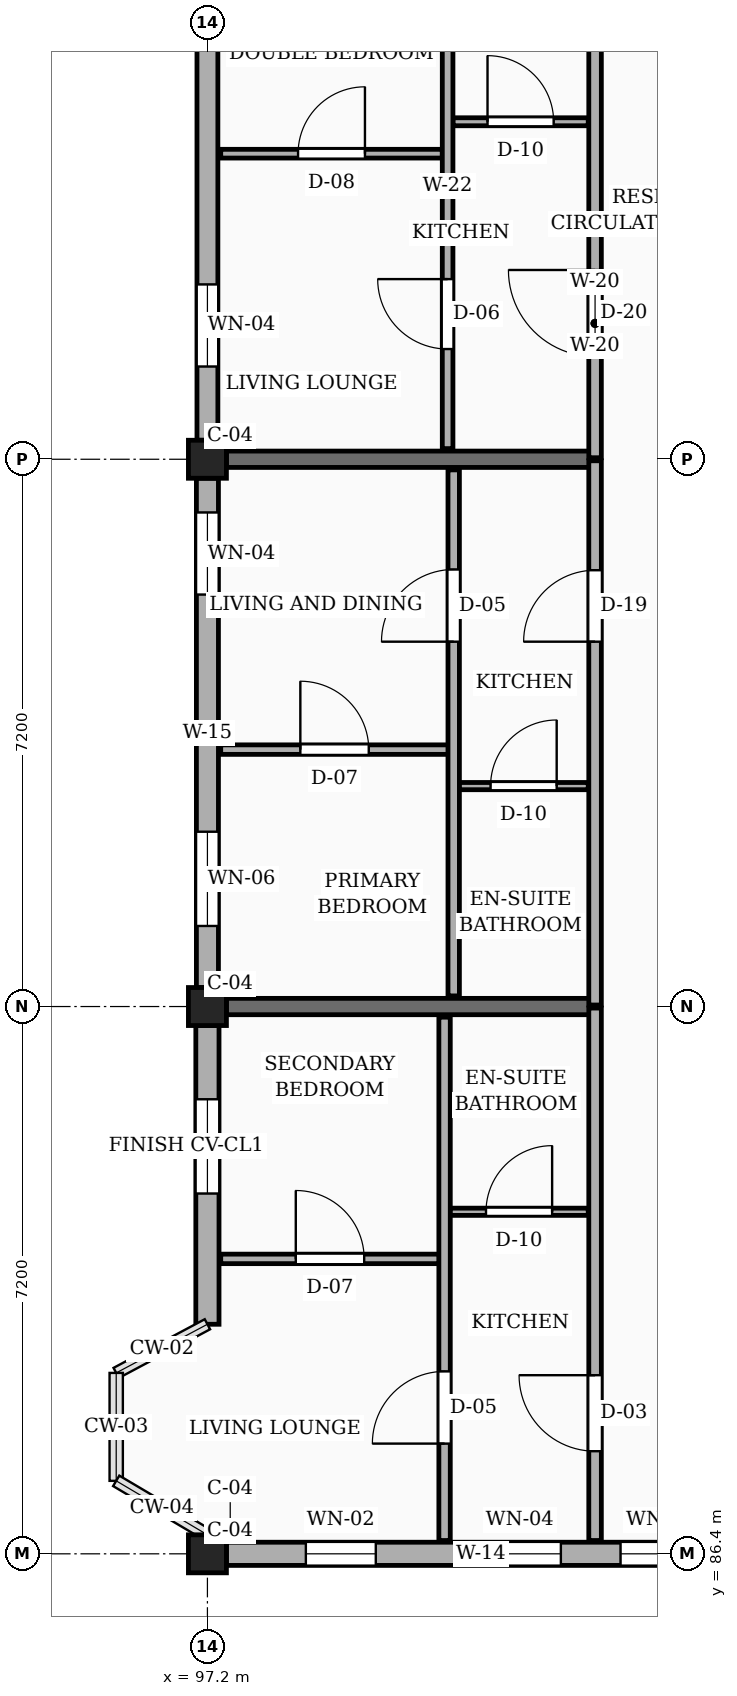
"""IFC4 building model, lengths in metres.
Left out: names, types, materials, properties, quantities, classifications, styles, units other than length and angle.
Written with IfcOpenShell. Run it as: python <this file> out.ifc"""

import sys

from ifc_helpers import new_model, si_unit, direction, frame, frame_2d, origin, origin_2d, place, context, subcontext, project, spatial, rectangle, extrude, element, fill, save


model = new_model("IFC4")
c1 = context("Model", 3, precision=1e-05, world=origin(), true_north=direction((0.0, 1.0)))
c2 = subcontext(c1, "Body", "Model", "MODEL_VIEW")
j1 = project(units=[si_unit("LENGTHUNIT", "METRE"), si_unit("PLANEANGLEUNIT", "RADIAN")], contexts=[c1])
p1 = place(None, origin())
s1 = spatial("IfcSite", under=j1, at=p1, CompositionType="ELEMENT")
p2 = place(p1, origin())
s2 = spatial("IfcBuilding", under=s1, at=p2, CompositionType="ELEMENT")
p3 = place(p2, frame((0.0, 0.0, 29.7)))
s3 = spatial("IfcBuildingStorey", under=s2, at=p3, CompositionType="ELEMENT", Elevation=29.7)
for number, where, z_axis, x_axis in (
    (1, (97.2, 86.4, 0.0), (0.0, 0.0, 1.0), (1.0, 0.0, 0.0)),
    (2, (97.2, 93.6, 0.0), (0.0, 0.0, 1.0), (1.0, 0.0, 0.0)),
    (3, (97.2, 100.8, 0.0), (0.0, 0.0, 1.0), (1.0, 0.0, 0.0)),
):
    element("IfcColumn", number, at=place(p3, frame(where, z_axis=z_axis, x_axis=x_axis)), inside=s3, PredefinedType="COLUMN", context=c2, shape_type="SweptSolid", body=[
        extrude(rectangle(XDim=0.5, YDim=0.5, at=origin_2d()), origin(), (0.0, 0.0, 1.0), 3.15),
    ])
for number, where, z_axis, x_axis in (
    (4, (97.45, 93.6, 0.0), (0.0, 0.0, 1.0), (1.0, 0.0, 0.0)),
    (5, (97.45, 100.8, 0.0), (0.0, 0.0, 1.0), (1.0, 0.0, 0.0)),
):
    element("IfcWall", number, at=place(p3, frame(where, z_axis=z_axis, x_axis=x_axis)), inside=s3, PredefinedType="SOLIDWALL", context=c2, shape_type="SweptSolid", body=[
        extrude(rectangle(XDim=4.85, YDim=0.215, at=frame_2d((2.425, 0.0))), origin(), (0.0, 0.0, 1.0), 2.19),
    ])
p4 = place(p3, frame((97.45, 86.4, 0.0), z_axis=(0.0, 0.0, 1.0), x_axis=(1.0, 0.0, 0.0)))
e6 = element("IfcWall", 6, at=p4, inside=s3, PredefinedType="SOLIDWALL", context=c2, shape_type="SweptSolid", body=[
    extrude(rectangle(XDim=6.7, YDim=0.305, at=frame_2d((3.35, 0.0))), origin(), (0.0, 0.0, 1.0), 2.46),
])
p5 = place(p4, frame((1.045, 0.0, 0.78)))
e7 = element("IfcOpeningElement", 7, at=p5, cuts=e6, PredefinedType="OPENING", context=c2, shape_type="SweptSolid", body=[
    extrude(rectangle(XDim=0.92, YDim=1.15, at=frame_2d((0.46, 0.575))), frame((0.0, 0.163, 0.0), z_axis=(0.0, -1.0, 0.0), x_axis=(1.0, 0.0, 0.0)), (0.0, 0.0, 1.0), 0.325),
])
p6 = place(p4, frame((3.32, 0.0, 0.78)))
e8 = element("IfcOpeningElement", 8, at=p6, cuts=e6, PredefinedType="OPENING", context=c2, shape_type="SweptSolid", body=[
    extrude(rectangle(XDim=1.08, YDim=1.15, at=frame_2d((0.54, 0.575))), frame((0.0, 0.163, 0.0), z_axis=(0.0, -1.0, 0.0), x_axis=(1.0, 0.0, 0.0)), (0.0, 0.0, 1.0), 0.325),
])
p7 = place(p4, frame((5.185, 0.0, 0.78)))
e9 = element("IfcOpeningElement", 9, at=p7, cuts=e6, PredefinedType="OPENING", context=c2, shape_type="SweptSolid", body=[
    extrude(rectangle(XDim=1.04, YDim=1.26, at=frame_2d((0.52, 0.63))), frame((0.0, 0.163, 0.0), z_axis=(0.0, -1.0, 0.0), x_axis=(1.0, 0.0, 0.0)), (0.0, 0.0, 1.0), 0.325),
])
p8 = place(p3, frame((97.2, 107.75, 0.0), z_axis=(0.0, 0.0, 1.0), x_axis=(0.0, -1.0, 0.0)))
e10 = element("IfcWall", 10, at=p8, inside=s3, PredefinedType="SOLIDWALL", context=c2, shape_type="SweptSolid", body=[
    extrude(rectangle(XDim=6.7, YDim=0.275, at=frame_2d((3.35, 0.0))), origin(), (0.0, 0.0, 1.0), 2.46),
])
p9 = place(p8, frame((0.45, 0.0, 0.78)))
e11 = element("IfcOpeningElement", 11, at=p9, cuts=e10, PredefinedType="OPENING", context=c2, shape_type="SweptSolid", body=[
    extrude(rectangle(XDim=0.92, YDim=1.15, at=frame_2d((0.46, 0.575))), frame((0.0, 0.147, 0.0), z_axis=(0.0, -1.0, 0.0), x_axis=(1.0, 0.0, 0.0)), (0.0, 0.0, 1.0), 0.295),
])
p10 = place(p8, frame((4.65, 0.0, 0.78)))
e12 = element("IfcOpeningElement", 12, at=p10, cuts=e10, PredefinedType="OPENING", context=c2, shape_type="SweptSolid", body=[
    extrude(rectangle(XDim=1.08, YDim=1.15, at=frame_2d((0.54, 0.575))), frame((0.0, 0.147, 0.0), z_axis=(0.0, -1.0, 0.0), x_axis=(1.0, 0.0, 0.0)), (0.0, 0.0, 1.0), 0.295),
])
p11 = place(p3, frame((97.2, 100.55, 0.0), z_axis=(0.0, 0.0, 1.0), x_axis=(0.0, -1.0, 0.0)))
e13 = element("IfcWall", 13, at=p11, inside=s3, PredefinedType="SOLIDWALL", context=c2, shape_type="SweptSolid", body=[
    extrude(rectangle(XDim=6.7, YDim=0.29, at=frame_2d((3.35, 0.0))), origin(), (0.0, 0.0, 1.0), 2.46),
])
p12 = place(p11, frame((0.45, 0.0, 0.78)))
e14 = element("IfcOpeningElement", 14, at=p12, cuts=e13, PredefinedType="OPENING", context=c2, shape_type="SweptSolid", body=[
    extrude(rectangle(XDim=1.08, YDim=1.15, at=frame_2d((0.54, 0.575))), frame((0.0, 0.155, 0.0), z_axis=(0.0, -1.0, 0.0), x_axis=(1.0, 0.0, 0.0)), (0.0, 0.0, 1.0), 0.31),
])
p13 = place(p11, frame((4.65, 0.0, 0.78)))
e15 = element("IfcOpeningElement", 15, at=p13, cuts=e13, PredefinedType="OPENING", context=c2, shape_type="SweptSolid", body=[
    extrude(rectangle(XDim=1.24, YDim=1.15, at=frame_2d((0.62, 0.575))), frame((0.0, 0.155, 0.0), z_axis=(0.0, -1.0, 0.0), x_axis=(1.0, 0.0, 0.0)), (0.0, 0.0, 1.0), 0.31),
])
p14 = place(p3, frame((97.2, 93.35, 0.0), z_axis=(0.0, 0.0, 1.0), x_axis=(0.0, -1.0, 0.0)))
e16 = element("IfcWall", 16, at=p14, inside=s3, PredefinedType="SOLIDWALL", context=c2, shape_type="SweptSolid", body=[
    extrude(rectangle(XDim=3.93, YDim=0.305, at=frame_2d((1.965, 0.0))), origin(), (0.0, 0.0, 1.0), 2.46),
])
p15 = place(p14, frame((0.97, 0.0, 0.78)))
e17 = element("IfcOpeningElement", 17, at=p15, cuts=e16, PredefinedType="OPENING", context=c2, shape_type="SweptSolid", body=[
    extrude(rectangle(XDim=1.24, YDim=1.15, at=frame_2d((0.62, 0.575))), frame((0.0, 0.163, 0.0), z_axis=(0.0, -1.0, 0.0), x_axis=(1.0, 0.0, 0.0)), (0.0, 0.0, 1.0), 0.325),
])
p16 = place(p3, frame((102.3, 86.575, 0.0), z_axis=(0.0, 0.0, 1.0), x_axis=(0.0, 1.0, 0.0)))
e18 = element("IfcWall", 18, at=p16, inside=s3, PredefinedType="PARTITIONING", context=c2, shape_type="SweptSolid", body=[
    extrude(rectangle(XDim=7.005, YDim=0.165, at=frame_2d((3.502, 0.0))), origin(), (0.0, 0.0, 1.0), 2.325),
])
p17 = place(p16, frame((1.175, 0.0, 0.0)))
e19 = element("IfcOpeningElement", 19, at=p17, cuts=e18, PredefinedType="OPENING", context=c2, shape_type="SweptSolid", body=[
    extrude(rectangle(XDim=1.0, YDim=2.15, at=frame_2d((0.5, 1.075))), frame((0.0, 0.093, 0.0), z_axis=(0.0, -1.0, 0.0), x_axis=(1.0, 0.0, 0.0)), (0.0, 0.0, 1.0), 0.185),
])
p18 = place(p3, frame((102.3, 93.62, 0.0), z_axis=(0.0, 0.0, 1.0), x_axis=(0.0, 1.0, 0.0)))
e20 = element("IfcWall", 20, at=p18, inside=s3, PredefinedType="PARTITIONING", context=c2, shape_type="SweptSolid", body=[
    extrude(rectangle(XDim=7.16, YDim=0.165, at=frame_2d((3.58, 0.0))), origin(), (0.0, 0.0, 1.0), 2.325),
])
p19 = place(p18, frame((4.78, 0.0, 0.0)))
e21 = element("IfcOpeningElement", 21, at=p19, cuts=e20, PredefinedType="OPENING", context=c2, shape_type="SweptSolid", body=[
    extrude(rectangle(XDim=0.94, YDim=2.12, at=frame_2d((0.47, 1.06))), frame((0.0, 0.093, 0.0), z_axis=(0.0, -1.0, 0.0), x_axis=(1.0, 0.0, 0.0)), (0.0, 0.0, 1.0), 0.185),
])
p20 = place(p3, frame((102.3, 100.82, 0.0), z_axis=(0.0, 0.0, 1.0), x_axis=(0.0, 1.0, 0.0)))
e22 = element("IfcWall", 22, at=p20, inside=s3, PredefinedType="PARTITIONING", context=c2, shape_type="SweptSolid", body=[
    extrude(rectangle(XDim=7.16, YDim=0.165, at=frame_2d((3.58, 0.0))), origin(), (0.0, 0.0, 1.0), 2.325),
])
p21 = place(p20, frame((1.33, 0.0, 0.0)))
e23 = element("IfcOpeningElement", 23, at=p21, cuts=e22, PredefinedType="OPENING", context=c2, shape_type="SweptSolid", body=[
    extrude(rectangle(XDim=1.14, YDim=2.18, at=frame_2d((0.57, 1.09))), frame((0.0, 0.093, 0.0), z_axis=(0.0, -1.0, 0.0), x_axis=(1.0, 0.0, 0.0)), (0.0, 0.0, 1.0), 0.185),
])
p22 = place(p3, frame((97.375, 90.28, 0.0), z_axis=(0.0, 0.0, 1.0), x_axis=(1.0, 0.0, 0.0)))
e24 = element("IfcWall", 24, at=p22, inside=s3, PredefinedType="PARTITIONING", context=c2, shape_type="SweptSolid", body=[
    extrude(rectangle(XDim=2.875, YDim=0.125, at=frame_2d((1.438, 0.0))), origin(), (0.0, 0.0, 1.0), 2.325),
])
p23 = place(p22, frame((0.988, 0.0, 0.0)))
e25 = element("IfcOpeningElement", 25, at=p23, cuts=e24, PredefinedType="OPENING", context=c2, shape_type="SweptSolid", body=[
    extrude(rectangle(XDim=0.9, YDim=2.1, at=frame_2d((0.45, 1.05))), frame((0.0, 0.073, 0.0), z_axis=(0.0, -1.0, 0.0), x_axis=(1.0, 0.0, 0.0)), (0.0, 0.0, 1.0), 0.145),
])
p24 = place(p3, frame((100.39, 90.9, 0.0), z_axis=(0.0, 0.0, 1.0), x_axis=(1.0, 0.0, 0.0)))
e26 = element("IfcWall", 26, at=p24, inside=s3, PredefinedType="PARTITIONING", context=c2, shape_type="SweptSolid", body=[
    extrude(rectangle(XDim=1.82, YDim=0.095, at=frame_2d((0.91, 0.0))), origin(), (0.0, 0.0, 1.0), 2.325),
])
p25 = place(p24, frame((0.475, 0.0, 0.0)))
e27 = element("IfcOpeningElement", 27, at=p25, cuts=e26, PredefinedType="OPENING", context=c2, shape_type="SweptSolid", body=[
    extrude(rectangle(XDim=0.87, YDim=2.05, at=frame_2d((0.435, 1.025))), frame((0.0, 0.058, 0.0), z_axis=(0.0, -1.0, 0.0), x_axis=(1.0, 0.0, 0.0)), (0.0, 0.0, 1.0), 0.115),
])
p26 = place(p3, frame((100.32, 86.575, 0.0), z_axis=(0.0, 0.0, 1.0), x_axis=(0.0, 1.0, 0.0)))
e28 = element("IfcWall", 28, at=p26, inside=s3, PredefinedType="PARTITIONING", context=c2, shape_type="SweptSolid", body=[
    extrude(rectangle(XDim=6.885, YDim=0.15, at=frame_2d((3.442, 0.0))), origin(), (0.0, 0.0, 1.0), 2.325),
])
p27 = place(p26, frame((1.275, 0.0, 0.0)))
e29 = element("IfcOpeningElement", 29, at=p27, cuts=e28, PredefinedType="OPENING", context=c2, shape_type="SweptSolid", body=[
    extrude(rectangle(XDim=0.95, YDim=2.1, at=frame_2d((0.475, 1.05))), frame((0.0, 0.085, 0.0), z_axis=(0.0, -1.0, 0.0), x_axis=(1.0, 0.0, 0.0)), (0.0, 0.0, 1.0), 0.17),
])
p28 = place(p3, frame((97.375, 96.98, 0.0), z_axis=(0.0, 0.0, 1.0), x_axis=(1.0, 0.0, 0.0)))
e30 = element("IfcWall", 30, at=p28, inside=s3, PredefinedType="PARTITIONING", context=c2, shape_type="SweptSolid", body=[
    extrude(rectangle(XDim=2.995, YDim=0.125, at=frame_2d((1.498, 0.0))), origin(), (0.0, 0.0, 1.0), 2.325),
])
p29 = place(p28, frame((1.048, 0.0, 0.0)))
e31 = element("IfcOpeningElement", 31, at=p29, cuts=e30, PredefinedType="OPENING", context=c2, shape_type="SweptSolid", body=[
    extrude(rectangle(XDim=0.9, YDim=2.1, at=frame_2d((0.45, 1.05))), frame((0.0, 0.073, 0.0), z_axis=(0.0, -1.0, 0.0), x_axis=(1.0, 0.0, 0.0)), (0.0, 0.0, 1.0), 0.145),
])
p30 = place(p3, frame((100.51, 96.5, 0.0), z_axis=(0.0, 0.0, 1.0), x_axis=(1.0, 0.0, 0.0)))
e32 = element("IfcWall", 32, at=p30, inside=s3, PredefinedType="PARTITIONING", context=c2, shape_type="SweptSolid", body=[
    extrude(rectangle(XDim=1.7, YDim=0.095, at=frame_2d((0.85, 0.0))), origin(), (0.0, 0.0, 1.0), 2.325),
])
p31 = place(p30, frame((0.415, 0.0, 0.0)))
e33 = element("IfcOpeningElement", 33, at=p31, cuts=e32, PredefinedType="OPENING", context=c2, shape_type="SweptSolid", body=[
    extrude(rectangle(XDim=0.87, YDim=2.05, at=frame_2d((0.435, 1.025))), frame((0.0, 0.058, 0.0), z_axis=(0.0, -1.0, 0.0), x_axis=(1.0, 0.0, 0.0)), (0.0, 0.0, 1.0), 0.115),
])
p32 = place(p3, frame((100.44, 93.74, 0.0), z_axis=(0.0, 0.0, 1.0), x_axis=(0.0, 1.0, 0.0)))
e34 = element("IfcWall", 34, at=p32, inside=s3, PredefinedType="PARTITIONING", context=c2, shape_type="SweptSolid", body=[
    extrude(rectangle(XDim=6.92, YDim=0.15, at=frame_2d((3.46, 0.0))), origin(), (0.0, 0.0, 1.0), 2.325),
])
p33 = place(p32, frame((4.66, 0.0, 0.0)))
e35 = element("IfcOpeningElement", 35, at=p33, cuts=e34, PredefinedType="OPENING", context=c2, shape_type="SweptSolid", body=[
    extrude(rectangle(XDim=0.95, YDim=2.1, at=frame_2d((0.475, 1.05))), frame((0.0, 0.085, 0.0), z_axis=(0.0, -1.0, 0.0), x_axis=(1.0, 0.0, 0.0)), (0.0, 0.0, 1.0), 0.17),
])
p34 = place(p3, frame((97.375, 104.82, 0.0), z_axis=(0.0, 0.0, 1.0), x_axis=(1.0, 0.0, 0.0)))
e36 = element("IfcWall", 36, at=p34, inside=s3, PredefinedType="PARTITIONING", context=c2, shape_type="SweptSolid", body=[
    extrude(rectangle(XDim=2.915, YDim=0.115, at=frame_2d((1.458, 0.0))), origin(), (0.0, 0.0, 1.0), 2.325),
])
p35 = place(p34, frame((1.018, 0.0, 0.0)))
e37 = element("IfcOpeningElement", 37, at=p35, cuts=e36, PredefinedType="OPENING", context=c2, shape_type="SweptSolid", body=[
    extrude(rectangle(XDim=0.88, YDim=2.08, at=frame_2d((0.44, 1.04))), frame((0.0, 0.067, 0.0), z_axis=(0.0, -1.0, 0.0), x_axis=(1.0, 0.0, 0.0)), (0.0, 0.0, 1.0), 0.135),
])
p36 = place(p3, frame((100.43, 105.24, 0.0), z_axis=(0.0, 0.0, 1.0), x_axis=(1.0, 0.0, 0.0)))
e38 = element("IfcWall", 38, at=p36, inside=s3, PredefinedType="PARTITIONING", context=c2, shape_type="SweptSolid", body=[
    extrude(rectangle(XDim=1.78, YDim=0.105, at=frame_2d((0.89, 0.0))), origin(), (0.0, 0.0, 1.0), 2.325),
])
p37 = place(p36, frame((0.455, 0.0, 0.0)))
e39 = element("IfcOpeningElement", 39, at=p37, cuts=e38, PredefinedType="OPENING", context=c2, shape_type="SweptSolid", body=[
    extrude(rectangle(XDim=0.87, YDim=2.05, at=frame_2d((0.435, 1.025))), frame((0.0, 0.062, 0.0), z_axis=(0.0, -1.0, 0.0), x_axis=(1.0, 0.0, 0.0)), (0.0, 0.0, 1.0), 0.125),
])
p38 = place(p3, frame((100.36, 100.94, 0.0), z_axis=(0.0, 0.0, 1.0), x_axis=(0.0, 1.0, 0.0)))
e40 = element("IfcWall", 40, at=p38, inside=s3, PredefinedType="PARTITIONING", context=c2, shape_type="SweptSolid", body=[
    extrude(rectangle(XDim=6.92, YDim=0.14, at=frame_2d((3.46, 0.0))), origin(), (0.0, 0.0, 1.0), 2.325),
])
p39 = place(p38, frame((1.31, 0.0, 0.0)))
e41 = element("IfcOpeningElement", 41, at=p39, cuts=e40, PredefinedType="OPENING", context=c2, shape_type="SweptSolid", body=[
    extrude(rectangle(XDim=0.92, YDim=2.1, at=frame_2d((0.46, 1.05))), frame((0.0, 0.08, 0.0), z_axis=(0.0, -1.0, 0.0), x_axis=(1.0, 0.0, 0.0)), (0.0, 0.0, 1.0), 0.16),
])
p40 = place(p5, origin())
e42 = element("IfcWindow", 42, at=p40, inside=s3, PartitioningType="SINGLE_PANEL", PredefinedType="WINDOW", context=c2, shape_type="SweptSolid", body=[
    extrude(rectangle(XDim=0.92, YDim=1.15, at=frame_2d((0.46, 0.575))), frame((0.0, 0.03, 0.0), z_axis=(0.0, -1.0, 0.0), x_axis=(1.0, 0.0, 0.0)), (0.0, 0.0, 1.0), 0.06),
])
fill(e7, e42)
p41 = place(p6, origin())
e43 = element("IfcWindow", 43, at=p41, inside=s3, PartitioningType="SINGLE_PANEL", PredefinedType="WINDOW", context=c2, shape_type="SweptSolid", body=[
    extrude(rectangle(XDim=1.08, YDim=1.15, at=frame_2d((0.54, 0.575))), frame((0.0, 0.03, 0.0), z_axis=(0.0, -1.0, 0.0), x_axis=(1.0, 0.0, 0.0)), (0.0, 0.0, 1.0), 0.06),
])
fill(e8, e43)
p42 = place(p7, origin())
e44 = element("IfcWindow", 44, at=p42, inside=s3, PartitioningType="SINGLE_PANEL", PredefinedType="WINDOW", context=c2, shape_type="SweptSolid", body=[
    extrude(rectangle(XDim=1.04, YDim=1.26, at=frame_2d((0.52, 0.63))), frame((0.0, 0.03, 0.0), z_axis=(0.0, -1.0, 0.0), x_axis=(1.0, 0.0, 0.0)), (0.0, 0.0, 1.0), 0.06),
])
fill(e9, e44)
p43 = place(p10, origin())
e45 = element("IfcWindow", 45, at=p43, inside=s3, PartitioningType="SINGLE_PANEL", PredefinedType="WINDOW", context=c2, shape_type="SweptSolid", body=[
    extrude(rectangle(XDim=1.08, YDim=1.15, at=frame_2d((0.54, 0.575))), frame((0.0, 0.03, 0.0), z_axis=(0.0, -1.0, 0.0), x_axis=(1.0, 0.0, 0.0)), (0.0, 0.0, 1.0), 0.06),
])
fill(e12, e45)
p44 = place(p12, origin())
e46 = element("IfcWindow", 46, at=p44, inside=s3, PartitioningType="SINGLE_PANEL", PredefinedType="WINDOW", context=c2, shape_type="SweptSolid", body=[
    extrude(rectangle(XDim=1.08, YDim=1.15, at=frame_2d((0.54, 0.575))), frame((0.0, 0.03, 0.0), z_axis=(0.0, -1.0, 0.0), x_axis=(1.0, 0.0, 0.0)), (0.0, 0.0, 1.0), 0.06),
])
fill(e14, e46)
p45 = place(p13, origin())
e47 = element("IfcWindow", 47, at=p45, inside=s3, PartitioningType="SINGLE_PANEL", PredefinedType="WINDOW", context=c2, shape_type="SweptSolid", body=[
    extrude(rectangle(XDim=1.24, YDim=1.15, at=frame_2d((0.62, 0.575))), frame((0.0, 0.03, 0.0), z_axis=(0.0, -1.0, 0.0), x_axis=(1.0, 0.0, 0.0)), (0.0, 0.0, 1.0), 0.06),
])
fill(e15, e47)
p46 = place(p15, origin())
e48 = element("IfcWindow", 48, at=p46, inside=s3, PartitioningType="SINGLE_PANEL", PredefinedType="WINDOW", context=c2, shape_type="SweptSolid", body=[
    extrude(rectangle(XDim=1.24, YDim=1.15, at=frame_2d((0.62, 0.575))), frame((0.0, 0.03, 0.0), z_axis=(0.0, -1.0, 0.0), x_axis=(1.0, 0.0, 0.0)), (0.0, 0.0, 1.0), 0.06),
])
fill(e17, e48)
p47 = place(p17, origin())
e49 = element("IfcDoor", 49, at=p47, inside=s3, OperationType="SINGLE_SWING_RIGHT", PredefinedType="DOOR", context=c2, shape_type="SweptSolid", body=[
    extrude(rectangle(XDim=1.0, YDim=2.15, at=frame_2d((0.5, 1.075))), frame((0.0, 0.025, 0.0), z_axis=(0.0, -1.0, 0.0), x_axis=(1.0, 0.0, 0.0)), (0.0, 0.0, 1.0), 0.05),
])
fill(e19, e49)
p48 = place(p19, origin())
e50 = element("IfcDoor", 50, at=p48, inside=s3, OperationType="SINGLE_SWING_LEFT", PredefinedType="DOOR", context=c2, shape_type="SweptSolid", body=[
    extrude(rectangle(XDim=0.94, YDim=2.12, at=frame_2d((0.47, 1.06))), frame((0.0, 0.025, 0.0), z_axis=(0.0, -1.0, 0.0), x_axis=(1.0, 0.0, 0.0)), (0.0, 0.0, 1.0), 0.05),
])
fill(e21, e50)
p49 = place(p21, origin())
e51 = element("IfcDoor", 51, at=p49, inside=s3, OperationType="SINGLE_SWING_RIGHT", PredefinedType="DOOR", context=c2, shape_type="SweptSolid", body=[
    extrude(rectangle(XDim=1.14, YDim=2.18, at=frame_2d((0.57, 1.09))), frame((0.0, 0.025, 0.0), z_axis=(0.0, -1.0, 0.0), x_axis=(1.0, 0.0, 0.0)), (0.0, 0.0, 1.0), 0.05),
])
fill(e23, e51)
p50 = place(p23, origin())
e52 = element("IfcDoor", 52, at=p50, inside=s3, OperationType="SINGLE_SWING_LEFT", PredefinedType="DOOR", context=c2, shape_type="SweptSolid", body=[
    extrude(rectangle(XDim=0.9, YDim=2.1, at=frame_2d((0.45, 1.05))), frame((0.0, 0.025, 0.0), z_axis=(0.0, -1.0, 0.0), x_axis=(1.0, 0.0, 0.0)), (0.0, 0.0, 1.0), 0.05),
])
fill(e25, e52)
p51 = place(p25, origin())
e53 = element("IfcDoor", 53, at=p51, inside=s3, OperationType="SINGLE_SWING_RIGHT", PredefinedType="DOOR", context=c2, shape_type="SweptSolid", body=[
    extrude(rectangle(XDim=0.87, YDim=2.05, at=frame_2d((0.435, 1.025))), frame((0.0, 0.025, 0.0), z_axis=(0.0, -1.0, 0.0), x_axis=(1.0, 0.0, 0.0)), (0.0, 0.0, 1.0), 0.05),
])
fill(e27, e53)
p52 = place(p27, origin())
e54 = element("IfcDoor", 54, at=p52, inside=s3, OperationType="SINGLE_SWING_LEFT", PredefinedType="DOOR", context=c2, shape_type="SweptSolid", body=[
    extrude(rectangle(XDim=0.95, YDim=2.1, at=frame_2d((0.475, 1.05))), frame((0.0, 0.025, 0.0), z_axis=(0.0, -1.0, 0.0), x_axis=(1.0, 0.0, 0.0)), (0.0, 0.0, 1.0), 0.05),
])
fill(e29, e54)
p53 = place(p29, origin())
e55 = element("IfcDoor", 55, at=p53, inside=s3, OperationType="SINGLE_SWING_LEFT", PredefinedType="DOOR", context=c2, shape_type="SweptSolid", body=[
    extrude(rectangle(XDim=0.9, YDim=2.1, at=frame_2d((0.45, 1.05))), frame((0.0, 0.025, 0.0), z_axis=(0.0, -1.0, 0.0), x_axis=(1.0, 0.0, 0.0)), (0.0, 0.0, 1.0), 0.05),
])
fill(e31, e55)
p54 = place(p31, origin())
e56 = element("IfcDoor", 56, at=p54, inside=s3, OperationType="SINGLE_SWING_RIGHT", PredefinedType="DOOR", context=c2, shape_type="SweptSolid", body=[
    extrude(rectangle(XDim=0.87, YDim=2.05, at=frame_2d((0.435, 1.025))), frame((0.0, 0.025, 0.0), z_axis=(0.0, -1.0, 0.0), x_axis=(1.0, 0.0, 0.0)), (0.0, 0.0, 1.0), 0.05),
])
fill(e33, e56)
p55 = place(p33, origin())
e57 = element("IfcDoor", 57, at=p55, inside=s3, OperationType="SINGLE_SWING_LEFT", PredefinedType="DOOR", context=c2, shape_type="SweptSolid", body=[
    extrude(rectangle(XDim=0.95, YDim=2.1, at=frame_2d((0.475, 1.05))), frame((0.0, 0.025, 0.0), z_axis=(0.0, -1.0, 0.0), x_axis=(1.0, 0.0, 0.0)), (0.0, 0.0, 1.0), 0.05),
])
fill(e35, e57)
p56 = place(p35, origin())
e58 = element("IfcDoor", 58, at=p56, inside=s3, OperationType="SINGLE_SWING_RIGHT", PredefinedType="DOOR", context=c2, shape_type="SweptSolid", body=[
    extrude(rectangle(XDim=0.88, YDim=2.08, at=frame_2d((0.44, 1.04))), frame((0.0, 0.025, 0.0), z_axis=(0.0, -1.0, 0.0), x_axis=(1.0, 0.0, 0.0)), (0.0, 0.0, 1.0), 0.05),
])
fill(e37, e58)
p57 = place(p37, origin())
e59 = element("IfcDoor", 59, at=p57, inside=s3, OperationType="SINGLE_SWING_LEFT", PredefinedType="DOOR", context=c2, shape_type="SweptSolid", body=[
    extrude(rectangle(XDim=0.87, YDim=2.05, at=frame_2d((0.435, 1.025))), frame((0.0, 0.025, 0.0), z_axis=(0.0, -1.0, 0.0), x_axis=(1.0, 0.0, 0.0)), (0.0, 0.0, 1.0), 0.05),
])
fill(e39, e59)
p58 = place(p39, origin())
e60 = element("IfcDoor", 60, at=p58, inside=s3, OperationType="SINGLE_SWING_RIGHT", PredefinedType="DOOR", context=c2, shape_type="SweptSolid", body=[
    extrude(rectangle(XDim=0.92, YDim=2.1, at=frame_2d((0.46, 1.05))), frame((0.0, 0.025, 0.0), z_axis=(0.0, -1.0, 0.0), x_axis=(1.0, 0.0, 0.0)), (0.0, 0.0, 1.0), 0.05),
])
fill(e41, e60)
save(model, sys.argv[1])
